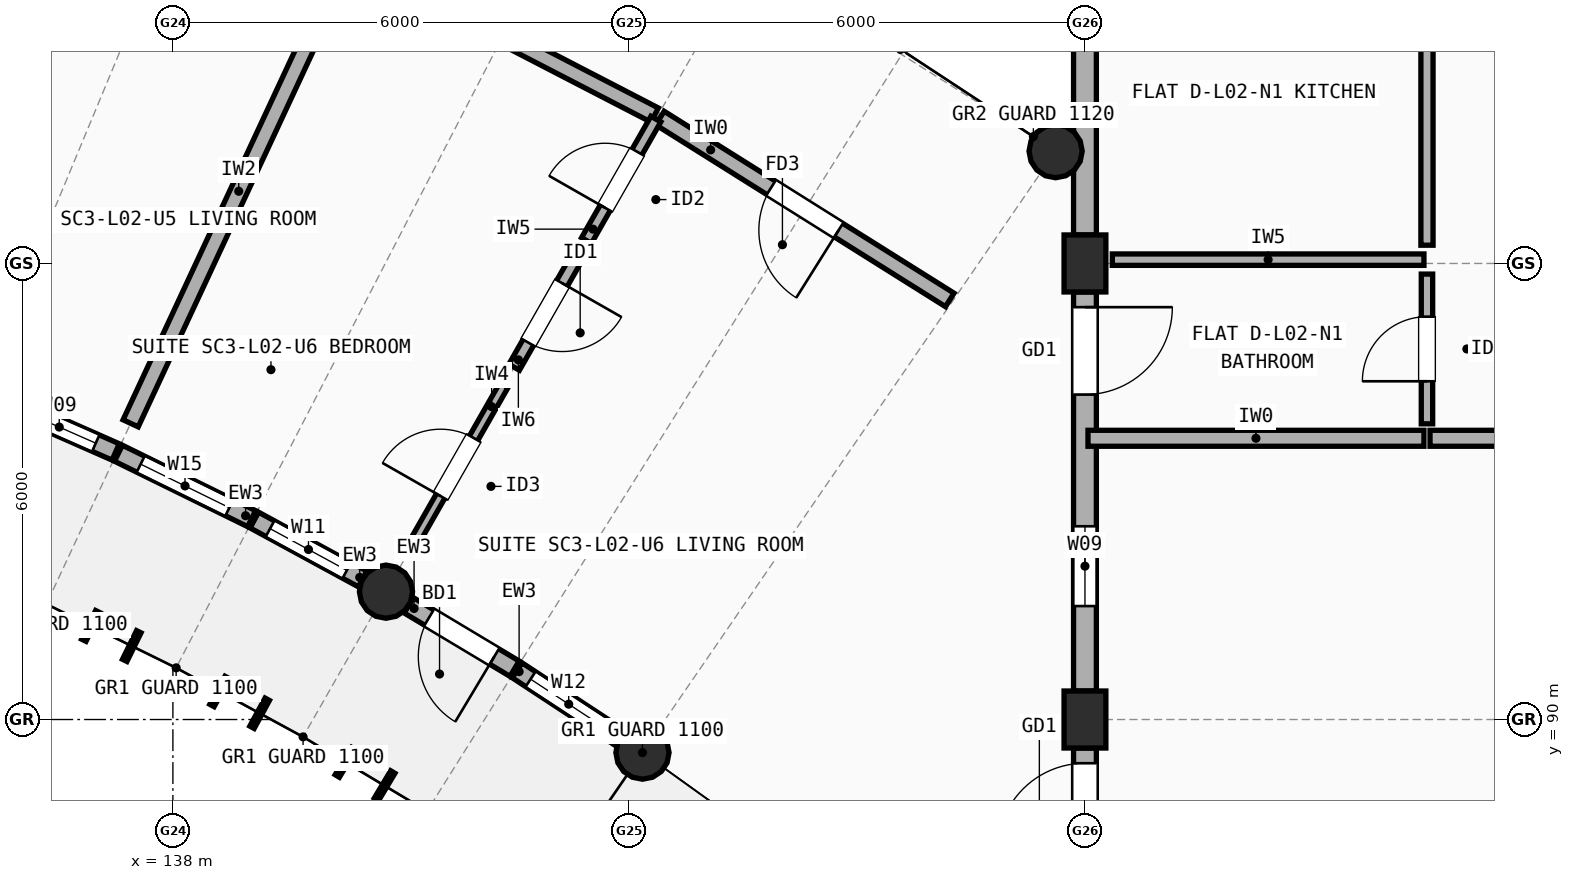
"""IFC4 building model, lengths in metres.
Left out: names, types, materials, properties, quantities, classifications, styles, units other than length and angle.
Written with IfcOpenShell. Run it as: python <this file> out.ifc"""

import sys

from ifc_helpers import new_model, si_unit, direction, frame, frame_2d, origin, origin_2d, place, context, subcontext, project, spatial, rectangle, circle, extrude, element, fill, save


model = new_model("IFC4")
c1 = context("Model", 3, precision=1e-05, world=origin(), true_north=direction((0.0, 1.0)))
c2 = subcontext(c1, "Body", "Model", "MODEL_VIEW")
j1 = project(units=[si_unit("LENGTHUNIT", "METRE"), si_unit("PLANEANGLEUNIT", "RADIAN")], contexts=[c1])
p1 = place(None, origin())
s1 = spatial("IfcSite", under=j1, at=p1, CompositionType="ELEMENT")
p2 = place(p1, origin())
s2 = spatial("IfcBuilding", under=s1, at=p2, CompositionType="ELEMENT")
p3 = place(p2, frame((0.0, 0.0, 7.7)))
s3 = spatial("IfcBuildingStorey", under=s2, at=p3, CompositionType="ELEMENT", Elevation=7.7)
for number, where, z_axis, x_axis in (
    (1, (150.0, 90.0, 0.0), (0.0, 0.0, 1.0), (1.0, 0.0, 0.0)),
    (2, (150.0, 96.0, 0.0), (0.0, 0.0, 1.0), (1.0, 0.0, 0.0)),
):
    element("IfcColumn", number, at=place(p3, frame(where, z_axis=z_axis, x_axis=x_axis)), inside=s3, PredefinedType="COLUMN", context=c2, shape_type="SweptSolid", body=[
        extrude(rectangle(XDim=0.55, YDim=0.75, at=origin_2d()), origin(), (0.0, 0.0, 1.0), 2.955),
    ])
for number, where, z_axis, x_axis in (
    (3, (140.804, 91.682, 0.0), (0.0, 0.0, 1.0), (1.0, 0.0, 0.0)),
    (4, (144.178, 89.564, 0.0), (0.0, 0.0, 1.0), (1.0, 0.0, 0.0)),
    (5, (149.614, 97.477, 0.0), (0.0, 0.0, 1.0), (1.0, 0.0, 0.0)),
):
    element("IfcColumn", number, at=place(p3, frame(where, z_axis=z_axis, x_axis=x_axis)), inside=s3, PredefinedType="COLUMN", context=c2, shape_type="SweptSolid", body=[
        extrude(circle(Radius=0.35, at=origin_2d()), origin(), (0.0, 0.0, 1.0), 2.948),
    ])
p4 = place(p3, frame((150.0, 101.625, 0.0), z_axis=(0.0, 0.0, 1.0), x_axis=(0.0, -1.0, 0.0)))
e6 = element("IfcWall", 6, at=p4, inside=s3, PredefinedType="STANDARD", context=c2, shape_type="SweptSolid", body=[
    extrude(rectangle(XDim=5.25, YDim=0.3, at=frame_2d((2.625, 0.0))), origin(), (0.0, 0.0, 1.0), 2.437),
])
p5 = place(p4, frame((1.339, 0.0, 0.9)))
e7 = element("IfcOpeningElement", 7, at=p5, cuts=e6, PredefinedType="OPENING", context=c2, shape_type="SweptSolid", body=[
    extrude(rectangle(XDim=0.95, YDim=1.35, at=frame_2d((0.475, 0.675))), frame((0.0, 0.16, 0.0), z_axis=(0.0, -1.0, 0.0), x_axis=(1.0, 0.0, 0.0)), (0.0, 0.0, 1.0), 0.32),
])
p6 = place(p3, frame((150.0, 95.625, 0.0), z_axis=(0.0, 0.0, 1.0), x_axis=(0.0, -1.0, 0.0)))
e8 = element("IfcWall", 8, at=p6, inside=s3, PredefinedType="STANDARD", context=c2, shape_type="SweptSolid", body=[
    extrude(rectangle(XDim=5.25, YDim=0.3, at=frame_2d((2.625, 0.0))), origin(), (0.0, 0.0, 1.0), 2.437),
])
p7 = place(p6, frame((0.2, 0.0, 0.0)))
e9 = element("IfcOpeningElement", 9, at=p7, cuts=e8, PredefinedType="OPENING", context=c2, shape_type="SweptSolid", body=[
    extrude(rectangle(XDim=1.15, YDim=2.15, at=frame_2d((0.575, 1.075))), frame((0.0, 0.16, 0.0), z_axis=(0.0, -1.0, 0.0), x_axis=(1.0, 0.0, 0.0)), (0.0, 0.0, 1.0), 0.32),
])
p8 = place(p6, frame((3.083, 0.0, 0.9)))
e10 = element("IfcOpeningElement", 10, at=p8, cuts=e8, PredefinedType="OPENING", context=c2, shape_type="SweptSolid", body=[
    extrude(rectangle(XDim=1.05, YDim=1.35, at=frame_2d((0.525, 0.675))), frame((0.0, 0.16, 0.0), z_axis=(0.0, -1.0, 0.0), x_axis=(1.0, 0.0, 0.0)), (0.0, 0.0, 1.0), 0.32),
])
p9 = place(p3, frame((150.0, 89.625, 0.0), z_axis=(0.0, 0.0, 1.0), x_axis=(0.0, -1.0, 0.0)))
e11 = element("IfcWall", 11, at=p9, inside=s3, PredefinedType="STANDARD", context=c2, shape_type="SweptSolid", body=[
    extrude(rectangle(XDim=5.25, YDim=0.3, at=frame_2d((2.625, 0.0))), origin(), (0.0, 0.0, 1.0), 2.437),
])
p10 = place(p9, frame((0.2, 0.0, 0.0)))
e12 = element("IfcOpeningElement", 12, at=p10, cuts=e11, PredefinedType="OPENING", context=c2, shape_type="SweptSolid", body=[
    extrude(rectangle(XDim=1.15, YDim=2.15, at=frame_2d((0.575, 1.075))), frame((0.0, 0.16, 0.0), z_axis=(0.0, -1.0, 0.0), x_axis=(1.0, 0.0, 0.0)), (0.0, 0.0, 1.0), 0.32),
])
p11 = place(p3, frame((135.762, 94.175, 0.0), z_axis=(0.0, 0.0, 1.0), x_axis=(0.915073009016, -0.403288219727, 0.0)))
e13 = element("IfcWall", 13, at=p11, inside=s3, PredefinedType="STANDARD", context=c2, shape_type="SweptSolid", body=[
    extrude(rectangle(XDim=1.622, YDim=0.235, at=frame_2d((0.811, 0.0))), origin(), (0.0, 0.0, 1.0), 2.684),
])
p12 = place(p11, frame((0.286, 0.0, 0.85)))
e14 = element("IfcOpeningElement", 14, at=p12, cuts=e13, PredefinedType="OPENING", context=c2, shape_type="SweptSolid", body=[
    extrude(rectangle(XDim=1.05, YDim=1.35, at=frame_2d((0.525, 0.675))), frame((0.0, 0.127, 0.0), z_axis=(0.0, -1.0, 0.0), x_axis=(1.0, 0.0, 0.0)), (0.0, 0.0, 1.0), 0.255),
])
p13 = place(p3, frame((137.283, 93.503, 0.0), z_axis=(0.0, 0.0, 1.0), x_axis=(0.897531751182, -0.44094983345, 0.0)))
e15 = element("IfcWall", 15, at=p13, inside=s3, PredefinedType="STANDARD", context=c2, shape_type="SweptSolid", body=[
    extrude(rectangle(XDim=1.952, YDim=0.235, at=frame_2d((0.976, 0.0))), origin(), (0.0, 0.0, 1.0), 2.684),
])
p14 = place(p13, frame((0.326, 0.0, 0.85)))
e16 = element("IfcOpeningElement", 16, at=p14, cuts=e15, PredefinedType="OPENING", context=c2, shape_type="SweptSolid", body=[
    extrude(rectangle(XDim=1.3, YDim=1.45, at=frame_2d((0.65, 0.725))), frame((0.0, 0.127, 0.0), z_axis=(0.0, -1.0, 0.0), x_axis=(1.0, 0.0, 0.0)), (0.0, 0.0, 1.0), 0.255),
])
p15 = place(p3, frame((139.071, 92.624, 0.0), z_axis=(0.0, 0.0, 1.0), x_axis=(0.878452871629, -0.477828999044, 0.0)))
e17 = element("IfcWall", 17, at=p15, inside=s3, PredefinedType="STANDARD", context=c2, shape_type="SweptSolid", body=[
    extrude(rectangle(XDim=1.622, YDim=0.235, at=frame_2d((0.811, 0.0))), origin(), (0.0, 0.0, 1.0), 2.684),
])
p16 = place(p15, frame((0.236, 0.0, 0.85)))
e18 = element("IfcOpeningElement", 18, at=p16, cuts=e17, PredefinedType="OPENING", context=c2, shape_type="SweptSolid", body=[
    extrude(rectangle(XDim=1.15, YDim=1.45, at=frame_2d((0.575, 0.725))), frame((0.0, 0.127, 0.0), z_axis=(0.0, -1.0, 0.0), x_axis=(1.0, 0.0, 0.0)), (0.0, 0.0, 1.0), 0.255),
])
p17 = place(p3, frame((141.104, 91.502, 0.0), z_axis=(0.0, 0.0, 1.0), x_axis=(0.85782472272, -0.513942355805, 0.0)))
e19 = element("IfcWall", 19, at=p17, inside=s3, PredefinedType="STANDARD", context=c2, shape_type="SweptSolid", body=[
    extrude(rectangle(XDim=1.622, YDim=0.235, at=frame_2d((0.811, 0.0))), origin(), (0.0, 0.0, 1.0), 2.684),
])
p18 = place(p17, frame((0.311, 0.0, 0.0)))
e20 = element("IfcOpeningElement", 20, at=p18, cuts=e19, PredefinedType="OPENING", context=c2, shape_type="SweptSolid", body=[
    extrude(rectangle(XDim=1.0, YDim=2.15, at=frame_2d((0.5, 1.075))), frame((0.0, 0.127, 0.0), z_axis=(0.0, -1.0, 0.0), x_axis=(1.0, 0.0, 0.0)), (0.0, 0.0, 1.0), 0.255),
])
p19 = place(p3, frame((142.53, 90.647, 0.0), z_axis=(0.0, 0.0, 1.0), x_axis=(0.835873156341, -0.548922641644, 0.0)))
e21 = element("IfcWall", 21, at=p19, inside=s3, PredefinedType="STANDARD", context=c2, shape_type="SweptSolid", body=[
    extrude(rectangle(XDim=1.623, YDim=0.235, at=frame_2d((0.811, 0.0))), origin(), (0.0, 0.0, 1.0), 2.684),
])
p20 = place(p19, frame((0.211, 0.0, 0.85)))
e22 = element("IfcOpeningElement", 22, at=p20, cuts=e21, PredefinedType="OPENING", context=c2, shape_type="SweptSolid", body=[
    extrude(rectangle(XDim=1.2, YDim=1.35, at=frame_2d((0.6, 0.675))), frame((0.0, 0.127, 0.0), z_axis=(0.0, -1.0, 0.0), x_axis=(1.0, 0.0, 0.0)), (0.0, 0.0, 1.0), 0.255),
])
p21 = place(p3, frame((150.04, 93.7, 0.0), z_axis=(0.0, 0.0, 1.0), x_axis=(1.0, 0.0, 0.0)))
e23 = element("IfcWall", 23, at=p21, inside=s3, PredefinedType="SOLIDWALL", context=c2, shape_type="SweptSolid", body=[
    extrude(rectangle(XDim=4.42, YDim=0.21, at=frame_2d((2.21, 0.0))), origin(), (0.0, 0.0, 1.0), 2.437),
])
p22 = place(p3, frame((154.54, 93.7, 0.0), z_axis=(0.0, 0.0, 1.0), x_axis=(1.0, 0.0, 0.0)))
e24 = element("IfcWall", 24, at=p22, inside=s3, PredefinedType="SOLIDWALL", context=c2, shape_type="SweptSolid", body=[
    extrude(rectangle(XDim=10.42, YDim=0.21, at=frame_2d((5.21, 0.0))), origin(), (0.0, 0.0, 1.0), 2.437),
])
p23 = place(p22, frame((4.72, 0.0, 0.0)))
e25 = element("IfcOpeningElement", 25, at=p23, cuts=e24, PredefinedType="OPENING", context=c2, shape_type="SweptSolid", body=[
    extrude(rectangle(XDim=0.98, YDim=2.15, at=frame_2d((0.49, 1.075))), frame((0.0, 0.115, 0.0), z_axis=(0.0, -1.0, 0.0), x_axis=(1.0, 0.0, 0.0)), (0.0, 0.0, 1.0), 0.23),
])
p24 = place(p3, frame((154.5, 96.24, 0.0), z_axis=(0.0, 0.0, 1.0), x_axis=(0.0, 1.0, 0.0)))
e26 = element("IfcWall", 26, at=p24, inside=s3, PredefinedType="PLUMBINGWALL", context=c2, shape_type="SweptSolid", body=[
    extrude(rectangle(XDim=7.37, YDim=0.16, at=frame_2d((3.685, 0.0))), origin(), (0.0, 0.0, 1.0), 2.437),
])
p25 = place(p24, frame((3.235, 0.0, 0.0)))
e27 = element("IfcOpeningElement", 27, at=p25, cuts=e26, PredefinedType="OPENING", context=c2, shape_type="SweptSolid", body=[
    extrude(rectangle(XDim=0.9, YDim=2.1, at=frame_2d((0.45, 1.05))), frame((0.0, 0.09, 0.0), z_axis=(0.0, -1.0, 0.0), x_axis=(1.0, 0.0, 0.0)), (0.0, 0.0, 1.0), 0.18),
])
p26 = place(p3, frame((154.5, 93.89, 0.0), z_axis=(0.0, 0.0, 1.0), x_axis=(0.0, 1.0, 0.0)))
e28 = element("IfcWall", 28, at=p26, inside=s3, PredefinedType="PARTITIONING", context=c2, shape_type="SweptSolid", body=[
    extrude(rectangle(XDim=1.97, YDim=0.15, at=frame_2d((0.985, 0.0))), origin(), (0.0, 0.0, 1.0), 2.955),
])
p27 = place(p26, frame((0.56, 0.0, 0.0)))
e29 = element("IfcOpeningElement", 29, at=p27, cuts=e28, PredefinedType="OPENING", context=c2, shape_type="SweptSolid", body=[
    extrude(rectangle(XDim=0.85, YDim=2.1, at=frame_2d((0.425, 1.05))), frame((0.0, 0.085, 0.0), z_axis=(0.0, -1.0, 0.0), x_axis=(1.0, 0.0, 0.0)), (0.0, 0.0, 1.0), 0.17),
])
p28 = place(p3, frame((150.36, 96.05, 0.0), z_axis=(0.0, 0.0, 1.0), x_axis=(1.0, 0.0, 0.0)))
e30 = element("IfcWall", 30, at=p28, inside=s3, PredefinedType="PARTITIONING", context=c2, shape_type="SweptSolid", body=[
    extrude(rectangle(XDim=4.1, YDim=0.15, at=frame_2d((2.05, 0.0))), origin(), (0.0, 0.0, 1.0), 2.387),
])
p29 = place(p3, frame((137.444, 93.897, 0.0), z_axis=(0.0, 0.0, 1.0), x_axis=(0.422206763189, 0.906499558256, 0.0)))
e31 = element("IfcWall", 31, at=p29, inside=s3, PredefinedType="SOLIDWALL", context=c2, shape_type="SweptSolid", body=[
    extrude(rectangle(XDim=6.736, YDim=0.22, at=frame_2d((3.368, 0.0))), origin(), (0.0, 0.0, 1.0), 2.762),
])
p30 = place(p3, frame((140.34, 100.021, 0.0), z_axis=(0.0, 0.0, 1.0), x_axis=(0.888214590482, -0.459428820662, 0.0)))
e32 = element("IfcWall", 32, at=p30, inside=s3, PredefinedType="SOLIDWALL", context=c2, shape_type="SweptSolid", body=[
    extrude(rectangle(XDim=4.501, YDim=0.21, at=frame_2d((2.251, 0.0))), origin(), (0.0, 0.0, 1.0), 2.722),
])
p31 = place(p3, frame((144.408, 97.913, 0.0), z_axis=(0.0, 0.0, 1.0), x_axis=(0.847037081085, -0.531533802563, 0.0)))
e33 = element("IfcWall", 33, at=p31, inside=s3, PredefinedType="SOLIDWALL", context=c2, shape_type="SweptSolid", body=[
    extrude(rectangle(XDim=4.501, YDim=0.21, at=frame_2d((2.25, 0.0))), origin(), (0.0, 0.0, 1.0), 2.762),
])
p32 = place(p31, frame((1.726, 0.0, 0.0)))
e34 = element("IfcOpeningElement", 34, at=p32, cuts=e33, PredefinedType="OPENING", context=c2, shape_type="SweptSolid", body=[
    extrude(rectangle(XDim=1.05, YDim=2.15, at=frame_2d((0.525, 1.075))), frame((0.0, 0.115, 0.0), z_axis=(0.0, -1.0, 0.0), x_axis=(1.0, 0.0, 0.0)), (0.0, 0.0, 1.0), 0.23),
])
p33 = place(p3, frame((141.125, 92.245, 0.0), z_axis=(0.0, 0.0, 1.0), x_axis=(0.49594810138, 0.868352164008, 0.0)))
e35 = element("IfcWall", 35, at=p33, inside=s3, PredefinedType="PARTITIONING", context=c2, shape_type="SweptSolid", body=[
    extrude(rectangle(XDim=2.48, YDim=0.125, at=frame_2d((1.24, 0.0))), origin(), (0.0, 0.0, 1.0), 2.742),
])
p34 = place(p33, frame((0.8, 0.0, 0.0)))
e36 = element("IfcOpeningElement", 36, at=p34, cuts=e35, PredefinedType="OPENING", context=c2, shape_type="SweptSolid", body=[
    extrude(rectangle(XDim=0.88, YDim=2.1, at=frame_2d((0.44, 1.05))), frame((0.0, 0.073, 0.0), z_axis=(0.0, -1.0, 0.0), x_axis=(1.0, 0.0, 0.0)), (0.0, 0.0, 1.0), 0.145),
])
p35 = place(p3, frame((142.49, 94.635, 0.0), z_axis=(0.0, 0.0, 1.0), x_axis=(0.49583578404, 0.868416302971, 0.0)))
e37 = element("IfcWall", 37, at=p35, inside=s3, PredefinedType="PLUMBINGWALL", context=c2, shape_type="SweptSolid", body=[
    extrude(rectangle(XDim=1.648, YDim=0.16, at=frame_2d((0.824, 0.0))), origin(), (0.0, 0.0, 1.0), 2.742),
])
p36 = place(p35, frame((0.374, 0.0, 0.0)))
e38 = element("IfcOpeningElement", 38, at=p36, cuts=e37, PredefinedType="OPENING", context=c2, shape_type="SweptSolid", body=[
    extrude(rectangle(XDim=0.9, YDim=2.1, at=frame_2d((0.45, 1.05))), frame((0.0, 0.09, 0.0), z_axis=(0.0, -1.0, 0.0), x_axis=(1.0, 0.0, 0.0)), (0.0, 0.0, 1.0), 0.18),
])
p37 = place(p3, frame((143.442, 96.302, 0.0), z_axis=(0.0, 0.0, 1.0), x_axis=(0.495938892217, 0.868357423638, 0.0)))
e39 = element("IfcWall", 39, at=p37, inside=s3, PredefinedType="PARTITIONING", context=c2, shape_type="SweptSolid", body=[
    extrude(rectangle(XDim=1.84, YDim=0.15, at=frame_2d((0.92, 0.0))), origin(), (0.0, 0.0, 1.0), 2.742),
])
p38 = place(p37, frame((0.495, 0.0, 0.0)))
e40 = element("IfcOpeningElement", 40, at=p38, cuts=e39, PredefinedType="OPENING", context=c2, shape_type="SweptSolid", body=[
    extrude(rectangle(XDim=0.85, YDim=2.1, at=frame_2d((0.425, 1.05))), frame((0.0, 0.085, 0.0), z_axis=(0.0, -1.0, 0.0), x_axis=(1.0, 0.0, 0.0)), (0.0, 0.0, 1.0), 0.17),
])
p39 = place(p7, frame((1.15, 0.0, 0.0), z_axis=(0.0, 0.0, 1.0), x_axis=(-1.0, 0.0, 0.0)))
e41 = element("IfcDoor", 41, at=p39, inside=s3, OperationType="SINGLE_SWING_LEFT", PredefinedType="DOOR", context=c2, shape_type="SweptSolid", body=[
    extrude(rectangle(XDim=1.15, YDim=2.15, at=frame_2d((0.575, 1.075))), frame((0.0, 0.025, 0.0), z_axis=(0.0, -1.0, 0.0), x_axis=(1.0, 0.0, 0.0)), (0.0, 0.0, 1.0), 0.05),
])
fill(e9, e41)
p40 = place(p8, origin())
e42 = element("IfcWindow", 42, at=p40, inside=s3, PartitioningType="SINGLE_PANEL", PredefinedType="WINDOW", context=c2, shape_type="SweptSolid", body=[
    extrude(rectangle(XDim=1.05, YDim=1.35, at=frame_2d((0.525, 0.675))), frame((0.0, 0.03, 0.0), z_axis=(0.0, -1.0, 0.0), x_axis=(1.0, 0.0, 0.0)), (0.0, 0.0, 1.0), 0.06),
])
fill(e10, e42)
p41 = place(p10, frame((1.15, 0.0, 0.0), z_axis=(0.0, 0.0, 1.0), x_axis=(-1.0, 0.0, 0.0)))
e43 = element("IfcDoor", 43, at=p41, inside=s3, OperationType="SINGLE_SWING_RIGHT", PredefinedType="DOOR", context=c2, shape_type="SweptSolid", body=[
    extrude(rectangle(XDim=1.15, YDim=2.15, at=frame_2d((0.575, 1.075))), frame((0.0, 0.025, 0.0), z_axis=(0.0, -1.0, 0.0), x_axis=(1.0, 0.0, 0.0)), (0.0, 0.0, 1.0), 0.05),
])
fill(e12, e43)
p42 = place(p12, origin())
e44 = element("IfcWindow", 44, at=p42, inside=s3, PartitioningType="SINGLE_PANEL", PredefinedType="WINDOW", context=c2, shape_type="SweptSolid", body=[
    extrude(rectangle(XDim=1.05, YDim=1.35, at=frame_2d((0.525, 0.675))), frame((0.0, 0.03, 0.0), z_axis=(0.0, -1.0, 0.0), x_axis=(1.0, 0.0, 0.0)), (0.0, 0.0, 1.0), 0.06),
])
fill(e14, e44)
p43 = place(p14, origin())
e45 = element("IfcWindow", 45, at=p43, inside=s3, PartitioningType="SINGLE_PANEL", PredefinedType="WINDOW", context=c2, shape_type="SweptSolid", body=[
    extrude(rectangle(XDim=1.3, YDim=1.45, at=frame_2d((0.65, 0.725))), frame((0.0, 0.03, 0.0), z_axis=(0.0, -1.0, 0.0), x_axis=(1.0, 0.0, 0.0)), (0.0, 0.0, 1.0), 0.06),
])
fill(e16, e45)
p44 = place(p16, origin())
e46 = element("IfcWindow", 46, at=p44, inside=s3, PartitioningType="SINGLE_PANEL", PredefinedType="WINDOW", context=c2, shape_type="SweptSolid", body=[
    extrude(rectangle(XDim=1.15, YDim=1.45, at=frame_2d((0.575, 0.725))), frame((0.0, 0.03, 0.0), z_axis=(0.0, -1.0, 0.0), x_axis=(1.0, 0.0, 0.0)), (0.0, 0.0, 1.0), 0.06),
])
fill(e18, e46)
p45 = place(p18, frame((1.0, 0.0, 0.0), z_axis=(0.0, 0.0, 1.0), x_axis=(-1.0, 0.0, 0.0)))
e47 = element("IfcDoor", 47, at=p45, inside=s3, OperationType="SINGLE_SWING_RIGHT", PredefinedType="DOOR", context=c2, shape_type="SweptSolid", body=[
    extrude(rectangle(XDim=1.0, YDim=2.15, at=frame_2d((0.5, 1.075))), frame((0.0, 0.025, 0.0), z_axis=(0.0, -1.0, 0.0), x_axis=(1.0, 0.0, 0.0)), (0.0, 0.0, 1.0), 0.05),
])
fill(e20, e47)
p46 = place(p20, origin())
e48 = element("IfcWindow", 48, at=p46, inside=s3, PartitioningType="SINGLE_PANEL", PredefinedType="WINDOW", context=c2, shape_type="SweptSolid", body=[
    extrude(rectangle(XDim=1.2, YDim=1.35, at=frame_2d((0.6, 0.675))), frame((0.0, 0.03, 0.0), z_axis=(0.0, -1.0, 0.0), x_axis=(1.0, 0.0, 0.0)), (0.0, 0.0, 1.0), 0.06),
])
fill(e22, e48)
p47 = place(p27, origin())
e49 = element("IfcDoor", 49, at=p47, inside=s3, OperationType="SINGLE_SWING_LEFT", PredefinedType="DOOR", context=c2, shape_type="SweptSolid", body=[
    extrude(rectangle(XDim=0.85, YDim=2.1, at=frame_2d((0.425, 1.05))), frame((0.0, 0.025, 0.0), z_axis=(0.0, -1.0, 0.0), x_axis=(1.0, 0.0, 0.0)), (0.0, 0.0, 1.0), 0.05),
])
fill(e29, e49)
p48 = place(p32, origin())
e50 = element("IfcDoor", 50, at=p48, inside=s3, OperationType="SINGLE_SWING_RIGHT", PredefinedType="DOOR", context=c2, shape_type="SweptSolid", body=[
    extrude(rectangle(XDim=1.05, YDim=2.15, at=frame_2d((0.525, 1.075))), frame((0.0, 0.025, 0.0), z_axis=(0.0, -1.0, 0.0), x_axis=(1.0, 0.0, 0.0)), (0.0, 0.0, 1.0), 0.05),
])
fill(e34, e50)
p49 = place(p34, origin())
e51 = element("IfcDoor", 51, at=p49, inside=s3, OperationType="SINGLE_SWING_LEFT", PredefinedType="DOOR", context=c2, shape_type="SweptSolid", body=[
    extrude(rectangle(XDim=0.88, YDim=2.1, at=frame_2d((0.44, 1.05))), frame((0.0, 0.025, 0.0), z_axis=(0.0, -1.0, 0.0), x_axis=(1.0, 0.0, 0.0)), (0.0, 0.0, 1.0), 0.05),
])
fill(e36, e51)
p50 = place(p36, origin())
e52 = element("IfcDoor", 52, at=p50, inside=s3, OperationType="SINGLE_SWING_RIGHT", PredefinedType="DOOR", context=c2, shape_type="SweptSolid", body=[
    extrude(rectangle(XDim=0.9, YDim=2.1, at=frame_2d((0.45, 1.05))), frame((0.0, 0.025, 0.0), z_axis=(0.0, -1.0, 0.0), x_axis=(1.0, 0.0, 0.0)), (0.0, 0.0, 1.0), 0.05),
])
fill(e38, e52)
p51 = place(p38, origin())
e53 = element("IfcDoor", 53, at=p51, inside=s3, OperationType="SINGLE_SWING_LEFT", PredefinedType="DOOR", context=c2, shape_type="SweptSolid", body=[
    extrude(rectangle(XDim=0.85, YDim=2.1, at=frame_2d((0.425, 1.05))), frame((0.0, 0.025, 0.0), z_axis=(0.0, -1.0, 0.0), x_axis=(1.0, 0.0, 0.0)), (0.0, 0.0, 1.0), 0.05),
])
fill(e40, e53)
save(model, sys.argv[1])
